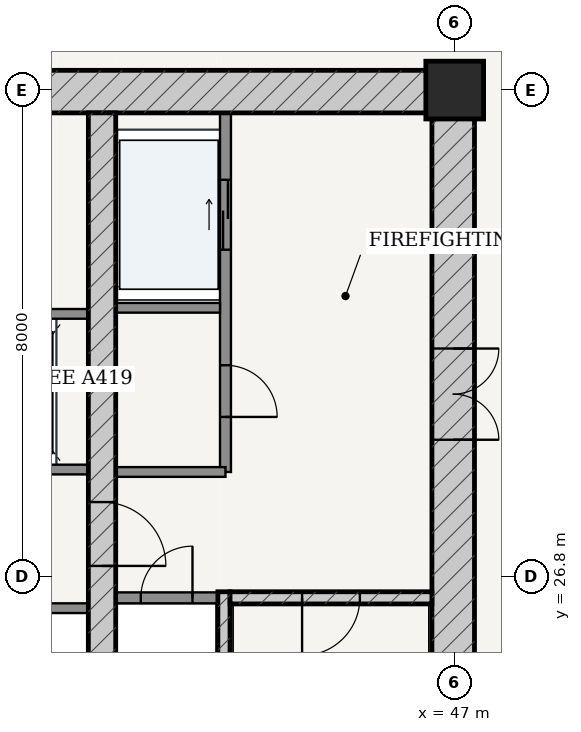
"""IFC4 building model, lengths in metres.
Left out: names, types, materials, properties, quantities, classifications, styles, units other than length and angle.
Written with IfcOpenShell. Run it as: python <this file> out.ifc"""

import sys

from ifc_helpers import new_model, si_unit, direction, frame, frame_2d, origin, origin_2d, place, context, subcontext, project, spatial, rectangle, extrude, source, transform, mapped, element, fill, save


model = new_model("IFC4")
c1 = context("Model", 3, precision=1e-05, world=origin(), true_north=direction((-0.2419218956, 0.970295726276)))
c2 = subcontext(c1, "Body", "Model", "MODEL_VIEW")
j1 = project(units=[si_unit("LENGTHUNIT", "METRE"), si_unit("PLANEANGLEUNIT", "RADIAN")], contexts=[c1])
p1 = place(None, origin())
s1 = spatial("IfcSite", under=j1, at=p1, CompositionType="ELEMENT")
p2 = place(p1, origin())
s2 = spatial("IfcBuilding", under=s1, at=p2, CompositionType="ELEMENT")
p3 = place(p2, frame((0.0, 0.0, 126.6)))
s3 = spatial("IfcBuildingStorey", under=s2, at=p3, CompositionType="ELEMENT", Elevation=126.6)
p4 = place(p3, frame((47.0, 34.8, 0.0), z_axis=(0.0, 0.0, 1.0), x_axis=(1.0, 0.0, 0.0)))
e1 = element("IfcColumn", 1, at=p4, inside=s3, PredefinedType="COLUMN", context=c2, shape_type="SweptSolid", body=[
    extrude(rectangle(XDim=0.95, YDim=0.95, at=origin_2d()), origin(), (0.0, 0.0, 1.0), 3.6),
])
p5 = place(p3, frame((28.675, 34.775, 0.0), z_axis=(0.0, 0.0, 1.0), x_axis=(1.0, 0.0, 0.0)))
e2 = element("IfcWall", 2, at=p5, inside=s3, PredefinedType="SHEAR", context=c2, shape_type="SweptSolid", body=[
    extrude(rectangle(XDim=18.65, YDim=0.7, at=frame_2d((9.325, 0.0))), origin(), (0.0, 0.0, 1.0), 3.15),
])
p6 = place(p5, frame((8.9, 0.0, 0.0)))
e3 = element("IfcOpeningElement", 3, at=p6, cuts=e2, PredefinedType="OPENING", context=c2, shape_type="SweptSolid", body=[
    extrude(rectangle(XDim=0.85, YDim=2.1, at=frame_2d((0.425, 1.05))), frame((0.0, 0.36, 0.0), z_axis=(0.0, -1.0, 0.0), x_axis=(1.0, 0.0, 0.0)), (0.0, 0.0, 1.0), 0.72),
])
p7 = place(p3, frame((46.975, 19.175, 0.0), z_axis=(0.0, 0.0, 1.0), x_axis=(0.0, 1.0, 0.0)))
e4 = element("IfcWall", 4, at=p7, inside=s3, PredefinedType="SHEAR", context=c2, shape_type="SweptSolid", body=[
    extrude(rectangle(XDim=15.25, YDim=0.7, at=frame_2d((7.625, 0.0))), origin(), (0.0, 0.0, 1.0), 3.15),
])
p8 = place(p7, frame((9.875, 0.0, 0.0)))
e5 = element("IfcOpeningElement", 5, at=p8, cuts=e4, PredefinedType="OPENING", context=c2, shape_type="SweptSolid", body=[
    extrude(rectangle(XDim=1.5, YDim=2.2, at=frame_2d((0.75, 1.1))), frame((0.0, 0.36, 0.0), z_axis=(0.0, -1.0, 0.0), x_axis=(1.0, 0.0, 0.0)), (0.0, 0.0, 1.0), 0.72),
])
p9 = place(p3, frame((43.205, 19.175, 0.0), z_axis=(0.0, 0.0, 1.0), x_axis=(0.0, 1.0, 0.0)))
e6 = element("IfcWall", 6, at=p9, inside=s3, PredefinedType="SOLIDWALL", context=c2, shape_type="SweptSolid", body=[
    extrude(rectangle(XDim=7.375, YDim=0.2, at=frame_2d((3.688, 0.0))), origin(), (0.0, 0.0, 1.0), 3.15),
])
p10 = place(p3, frame((43.305, 26.45, 0.0), z_axis=(0.0, 0.0, 1.0), x_axis=(1.0, 0.0, 0.0)))
e7 = element("IfcWall", 7, at=p10, inside=s3, PredefinedType="SOLIDWALL", context=c2, shape_type="SweptSolid", body=[
    extrude(rectangle(XDim=3.32, YDim=0.2, at=frame_2d((1.66, 0.0))), origin(), (0.0, 0.0, 1.0), 3.15),
])
p11 = place(p10, frame((1.185, 0.0, 0.0)))
e8 = element("IfcOpeningElement", 8, at=p11, cuts=e7, PredefinedType="OPENING", context=c2, shape_type="SweptSolid", body=[
    extrude(rectangle(XDim=0.95, YDim=2.15, at=frame_2d((0.475, 1.075))), frame((0.0, 0.11, 0.0), z_axis=(0.0, -1.0, 0.0), x_axis=(1.0, 0.0, 0.0)), (0.0, 0.0, 1.0), 0.22),
])
p12 = place(p3, frame((41.2, 19.175, 0.0), z_axis=(0.0, 0.0, 1.0), x_axis=(0.0, 1.0, 0.0)))
e9 = element("IfcWall", 9, at=p12, inside=s3, PredefinedType="SHEAR", context=c2, shape_type="SweptSolid", body=[
    extrude(rectangle(XDim=15.25, YDim=0.45, at=frame_2d((7.625, 0.0))), origin(), (0.0, 0.0, 1.0), 3.15),
])
p13 = place(p12, frame((7.8, 0.0, 0.0)))
e10 = element("IfcOpeningElement", 10, at=p13, cuts=e9, PredefinedType="OPENING", context=c2, shape_type="SweptSolid", body=[
    extrude(rectangle(XDim=1.05, YDim=2.15, at=frame_2d((0.525, 1.075))), frame((0.0, 0.235, 0.0), z_axis=(0.0, -1.0, 0.0), x_axis=(1.0, 0.0, 0.0)), (0.0, 0.0, 1.0), 0.47),
])
p14 = place(p3, frame((41.425, 26.45, 0.0), z_axis=(0.0, 0.0, 1.0), x_axis=(1.0, 0.0, 0.0)))
e11 = element("IfcWall", 11, at=p14, inside=s3, PredefinedType="PARTITIONING", context=c2, shape_type="SweptSolid", body=[
    extrude(rectangle(XDim=1.675, YDim=0.18, at=frame_2d((0.837, 0.0))), origin(), (0.0, 0.0, 1.0), 3.15),
])
p15 = place(p14, frame((0.413, 0.0, 0.0)))
e12 = element("IfcOpeningElement", 12, at=p15, cuts=e11, PredefinedType="OPENING", context=c2, shape_type="SweptSolid", body=[
    extrude(rectangle(XDim=0.85, YDim=2.1, at=frame_2d((0.425, 1.05))), frame((0.0, 0.1, 0.0), z_axis=(0.0, -1.0, 0.0), x_axis=(1.0, 0.0, 0.0)), (0.0, 0.0, 1.0), 0.2),
])
p16 = place(p3, frame((43.23, 28.52, 0.0), z_axis=(0.0, 0.0, 1.0), x_axis=(0.0, 1.0, 0.0)))
e13 = element("IfcWall", 13, at=p16, inside=s3, PredefinedType="PARTITIONING", context=c2, shape_type="SweptSolid", body=[
    extrude(rectangle(XDim=5.905, YDim=0.18, at=frame_2d((2.953, 0.0))), origin(), (0.0, 0.0, 1.0), 3.15),
])
p17 = place(p16, frame((0.905, 0.0, 0.0)))
e14 = element("IfcOpeningElement", 14, at=p17, cuts=e13, PredefinedType="OPENING", context=c2, shape_type="SweptSolid", body=[
    extrude(rectangle(XDim=0.85, YDim=2.1, at=frame_2d((0.425, 1.05))), frame((0.0, 0.1, 0.0), z_axis=(0.0, -1.0, 0.0), x_axis=(1.0, 0.0, 0.0)), (0.0, 0.0, 1.0), 0.2),
])
p18 = place(p16, frame((3.655, 0.0, 0.0)))
e15 = element("IfcOpeningElement", 15, at=p18, cuts=e13, PredefinedType="OPENING", context=c2, shape_type="SweptSolid", body=[
    extrude(rectangle(XDim=1.15, YDim=2.2, at=frame_2d((0.575, 1.1))), frame((0.0, 0.1, 0.0), z_axis=(0.0, -1.0, 0.0), x_axis=(1.0, 0.0, 0.0)), (0.0, 0.0, 1.0), 0.2),
])
p19 = place(p3, frame((41.425, 31.22, 0.0), z_axis=(0.0, 0.0, 1.0), x_axis=(1.0, 0.0, 0.0)))
e16 = element("IfcWall", 16, at=p19, inside=s3, PredefinedType="PARTITIONING", context=c2, shape_type="SweptSolid", body=[
    extrude(rectangle(XDim=1.715, YDim=0.16, at=frame_2d((0.857, 0.0))), origin(), (0.0, 0.0, 1.0), 3.15),
])
p20 = place(p3, frame((41.425, 28.52, 0.0), z_axis=(0.0, 0.0, 1.0), x_axis=(1.0, 0.0, 0.0)))
e17 = element("IfcWall", 17, at=p20, inside=s3, PredefinedType="PARTITIONING", context=c2, shape_type="SweptSolid", body=[
    extrude(rectangle(XDim=1.805, YDim=0.16, at=frame_2d((0.902, 0.0))), origin(), (0.0, 0.0, 1.0), 3.15),
])
p21 = place(p3, frame((35.025, 28.56, 0.0), z_axis=(0.0, 0.0, 1.0), x_axis=(1.0, 0.0, 0.0)))
e18 = element("IfcWall", 18, at=p21, inside=s3, PredefinedType="PARTITIONING", context=c2, shape_type="SweptSolid", body=[
    extrude(rectangle(XDim=5.95, YDim=0.16, at=frame_2d((2.975, 0.0))), origin(), (0.0, 0.0, 1.0), 3.15),
])
p22 = place(p21, frame((0.76, 0.0, 0.0)))
e19 = element("IfcOpeningElement", 19, at=p22, cuts=e18, PredefinedType="OPENING", context=c2, shape_type="SweptSolid", body=[
    extrude(rectangle(XDim=1.1, YDim=2.2, at=frame_2d((0.55, 1.1))), frame((0.0, 0.09, 0.0), z_axis=(0.0, -1.0, 0.0), x_axis=(1.0, 0.0, 0.0)), (0.0, 0.0, 1.0), 0.18),
])
p23 = place(p21, frame((2.425, 0.0, 0.0)))
e20 = element("IfcOpeningElement", 20, at=p23, cuts=e18, PredefinedType="OPENING", context=c2, shape_type="SweptSolid", body=[
    extrude(rectangle(XDim=1.1, YDim=2.2, at=frame_2d((0.55, 1.1))), frame((0.0, 0.09, 0.0), z_axis=(0.0, -1.0, 0.0), x_axis=(1.0, 0.0, 0.0)), (0.0, 0.0, 1.0), 0.18),
])
p24 = place(p21, frame((4.09, 0.0, 0.0)))
e21 = element("IfcOpeningElement", 21, at=p24, cuts=e18, PredefinedType="OPENING", context=c2, shape_type="SweptSolid", body=[
    extrude(rectangle(XDim=1.1, YDim=2.2, at=frame_2d((0.55, 1.1))), frame((0.0, 0.09, 0.0), z_axis=(0.0, -1.0, 0.0), x_axis=(1.0, 0.0, 0.0)), (0.0, 0.0, 1.0), 0.18),
])
for number, where, z_axis, x_axis in (
    (22, (35.025, 31.12, 0.0), (0.0, 0.0, 1.0), (1.0, 0.0, 0.0)),
    (23, (35.025, 26.28, 0.0), (0.0, 0.0, 1.0), (1.0, 0.0, 0.0)),
):
    element("IfcWall", number, at=place(p3, frame(where, z_axis=z_axis, x_axis=x_axis)), inside=s3, PredefinedType="PARTITIONING", context=c2, shape_type="SweptSolid", body=[
        extrude(rectangle(XDim=5.95, YDim=0.16, at=frame_2d((2.975, 0.0))), origin(), (0.0, 0.0, 1.0), 3.15),
    ])
m1 = source(origin(), c2, "Body", "SweptSolid", [
    extrude(rectangle(XDim=1.5, YDim=2.2, at=frame_2d((0.75, 1.1))), frame((0.0, 0.025, 0.0), z_axis=(0.0, -1.0, 0.0), x_axis=(1.0, 0.0, 0.0)), (0.0, 0.0, 1.0), 0.05),
])
p25 = place(p8, frame((1.5, 0.0, 0.0), z_axis=(0.0, 0.0, 1.0), x_axis=(-1.0, 0.0, 0.0)))
e24 = element("IfcDoor", 24, at=p25, inside=s3, OperationType="DOUBLE_DOOR_SINGLE_SWING", PredefinedType="DOOR", context=c2, shape_type="MappedRepresentation", body=[
    mapped(m1, transform((0.0, 0.0, 0.0), scale=1.0)),
])
fill(e5, e24)
m2 = source(origin(), c2, "Body", "SweptSolid", [
    extrude(rectangle(XDim=1.05, YDim=2.15, at=frame_2d((0.525, 1.075))), frame((0.0, 0.025, 0.0), z_axis=(0.0, -1.0, 0.0), x_axis=(1.0, 0.0, 0.0)), (0.0, 0.0, 1.0), 0.05),
])
p26 = place(p13, frame((1.05, 0.0, 0.0), z_axis=(0.0, 0.0, 1.0), x_axis=(-1.0, 0.0, 0.0)))
e25 = element("IfcDoor", 25, at=p26, inside=s3, OperationType="SINGLE_SWING_RIGHT", PredefinedType="DOOR", context=c2, shape_type="MappedRepresentation", body=[
    mapped(m2, transform((0.0, 0.0, 0.0), scale=1.0)),
])
fill(e10, e25)
m3 = source(origin(), c2, "Body", "SweptSolid", [
    extrude(rectangle(XDim=0.95, YDim=2.15, at=frame_2d((0.475, 1.075))), frame((0.0, 0.025, 0.0), z_axis=(0.0, -1.0, 0.0), x_axis=(1.0, 0.0, 0.0)), (0.0, 0.0, 1.0), 0.05),
])
p27 = place(p11, frame((0.95, 0.0, 0.0), z_axis=(0.0, 0.0, 1.0), x_axis=(-1.0, 0.0, 0.0)))
e26 = element("IfcDoor", 26, at=p27, inside=s3, OperationType="SINGLE_SWING_RIGHT", PredefinedType="DOOR", context=c2, shape_type="MappedRepresentation", body=[
    mapped(m3, transform((0.0, 0.0, 0.0), scale=1.0)),
])
fill(e8, e26)
m4 = source(origin(), c2, "Body", "SweptSolid", [
    extrude(rectangle(XDim=0.85, YDim=2.1, at=frame_2d((0.425, 1.05))), frame((0.0, 0.025, 0.0), z_axis=(0.0, -1.0, 0.0), x_axis=(1.0, 0.0, 0.0)), (0.0, 0.0, 1.0), 0.05),
])
p28 = place(p15, origin())
e27 = element("IfcDoor", 27, at=p28, inside=s3, OperationType="SINGLE_SWING_RIGHT", PredefinedType="DOOR", context=c2, shape_type="MappedRepresentation", body=[
    mapped(m4, transform((0.0, 0.0, 0.0), scale=1.0)),
])
fill(e12, e27)
p29 = place(p17, frame((0.85, 0.0, 0.0), z_axis=(0.0, 0.0, 1.0), x_axis=(-1.0, 0.0, 0.0)))
e28 = element("IfcDoor", 28, at=p29, inside=s3, OperationType="SINGLE_SWING_RIGHT", PredefinedType="DOOR", context=c2, shape_type="MappedRepresentation", body=[
    mapped(m4, transform((0.0, 0.0, 0.0), scale=1.0)),
])
fill(e14, e28)
m5 = source(origin(), c2, "Body", "SweptSolid", [
    extrude(rectangle(XDim=1.15, YDim=2.2, at=frame_2d((0.575, 1.1))), frame((0.0, 0.025, 0.0), z_axis=(0.0, -1.0, 0.0), x_axis=(1.0, 0.0, 0.0)), (0.0, 0.0, 1.0), 0.05),
])
p30 = place(p18, origin())
e29 = element("IfcDoor", 29, at=p30, inside=s3, OperationType="DOUBLE_DOOR_SLIDING", PredefinedType="DOOR", context=c2, shape_type="MappedRepresentation", body=[
    mapped(m5, transform((0.0, 0.0, 0.0), scale=1.0)),
])
fill(e15, e29)
save(model, sys.argv[1])
